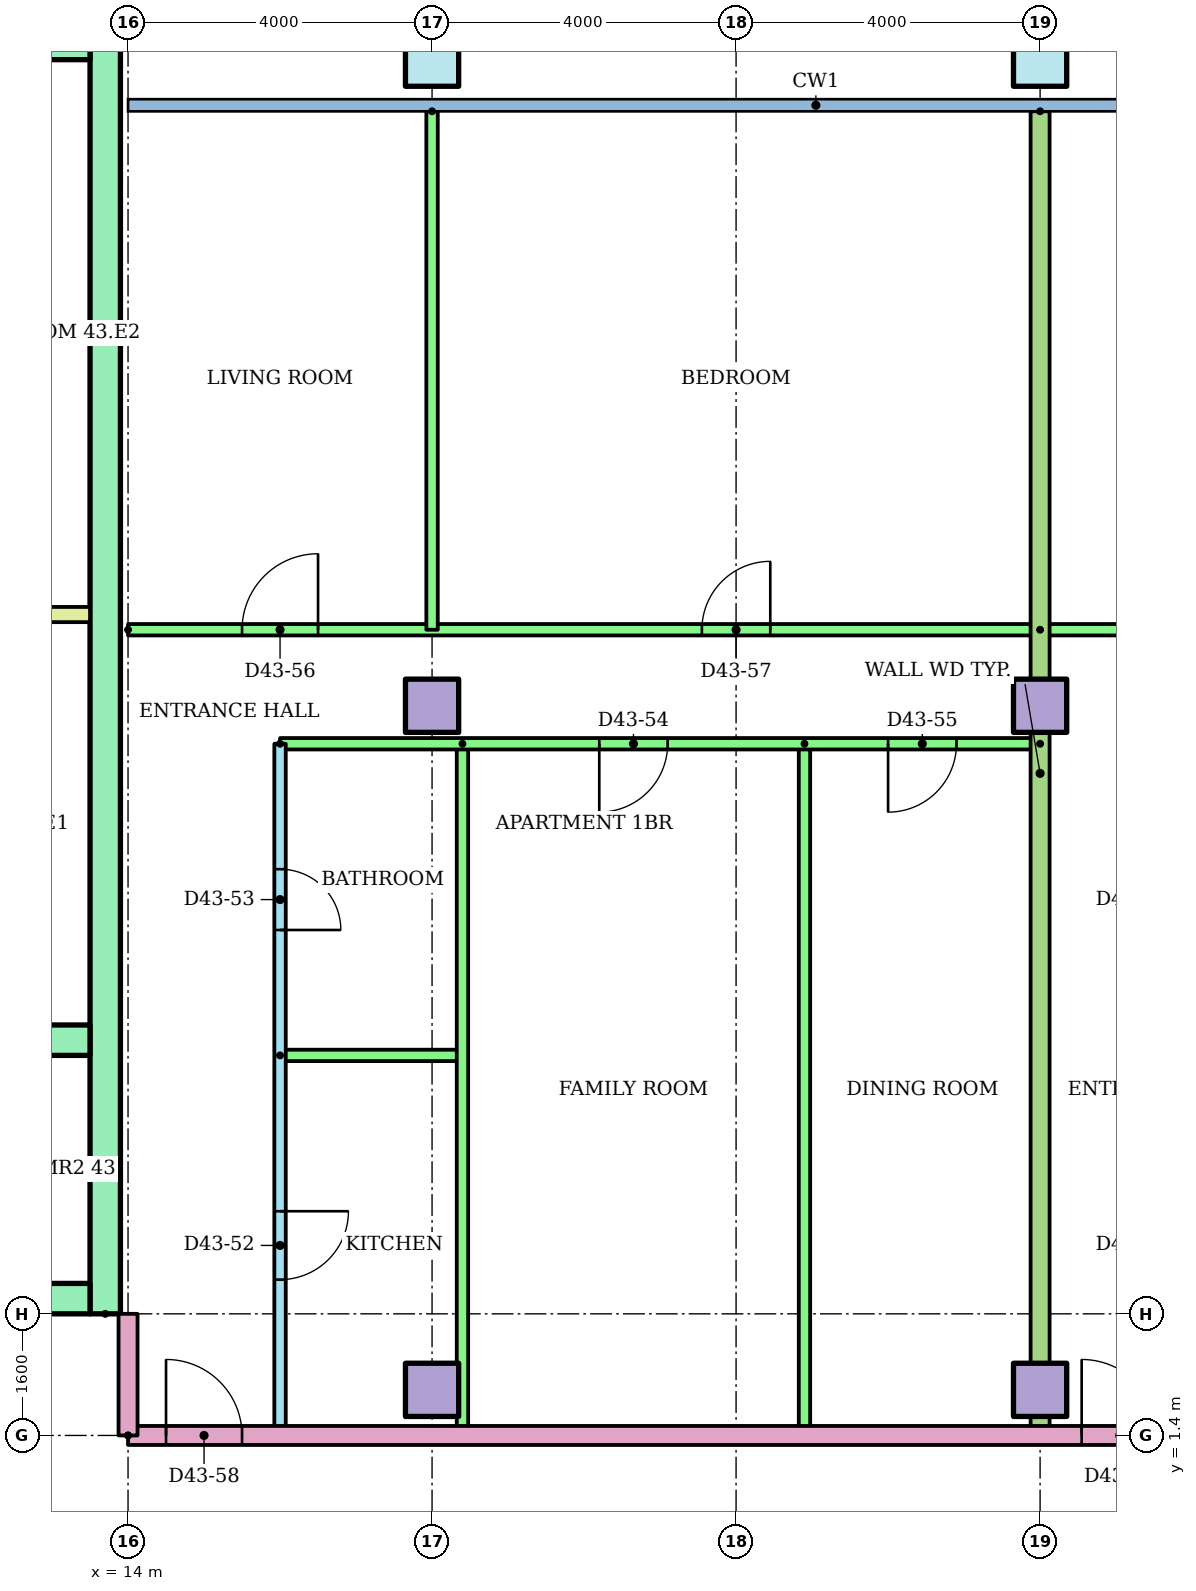
"""IFC4 building model, lengths in metres.
Left out: names, types, materials, properties, quantities, classifications, styles, units other than length and angle.
Written with IfcOpenShell. Run it as: python <this file> out.ifc"""

import sys

from ifc_helpers import new_model, si_unit, direction, frame, frame_2d, origin, origin_2d, place, context, subcontext, project, spatial, rectangle, hollow_rectangle, extrude, element, fill, save


model = new_model("IFC4")
c1 = context("Model", 3, precision=1e-05, world=origin(), true_north=direction((0.0, 1.0)))
c2 = subcontext(c1, "Body", "Model", "MODEL_VIEW")
j1 = project(units=[si_unit("LENGTHUNIT", "METRE"), si_unit("PLANEANGLEUNIT", "RADIAN")], contexts=[c1])
p1 = place(None, origin())
s1 = spatial("IfcSite", under=j1, at=p1, CompositionType="ELEMENT")
p2 = place(p1, origin())
s2 = spatial("IfcBuilding", under=s1, at=p2, CompositionType="ELEMENT")
p3 = place(p2, frame((0.0, 0.0, 168.5)))
s3 = spatial("IfcBuildingStorey", under=s2, at=p3, CompositionType="ELEMENT", Elevation=168.5)
for number, where in (
    (1, (18.0, 2.0, 0.0)),
    (2, (26.0, 2.0, 0.0)),
    (3, (18.0, 11.0, 0.0)),
    (4, (26.0, 11.0, 0.0)),
):
    element("IfcColumn", number, at=place(p3, frame(where)), inside=s3, PredefinedType="COLUMN", context=c2, shape_type="SweptSolid", body=[
        extrude(rectangle(XDim=0.7, YDim=0.7, at=origin_2d()), origin(), (0.0, 0.0, 1.0), 3.2),
    ])
for number, where in (
    (5, (18.0, 19.5, 0.0)),
    (6, (26.0, 19.5, 0.0)),
):
    element("IfcColumn", number, at=place(p3, frame(where)), inside=s3, PredefinedType="COLUMN", context=c2, shape_type="SweptSolid", body=[
        extrude(hollow_rectangle(XDim=0.7, YDim=0.7, WallThickness=0.036, at=origin_2d()), origin(), (0.0, 0.0, 1.0), 3.2),
    ])
p4 = place(p3, frame((13.7, 3.0, 0.0), z_axis=(0.0, 0.0, 1.0), x_axis=(0.0, 1.0, 0.0)))
e7 = element("IfcWall", 7, at=p4, inside=s3, PredefinedType="SHEAR", context=c2, shape_type="SweptSolid", body=[
    extrude(rectangle(XDim=17.0, YDim=0.4, at=frame_2d((8.5, 0.0))), origin(), (0.0, 0.0, 1.0), 2.92),
])
p5 = place(p3, frame((-13.5, 19.7, 0.0)))
e8 = element("IfcWall", 8, at=p5, inside=s3, PredefinedType="SHEAR", context=c2, shape_type="SweptSolid", body=[
    extrude(rectangle(XDim=27.0, YDim=0.4, at=frame_2d((13.5, 0.0))), origin(), (0.0, 0.0, 1.0), 2.92),
])
p6 = place(p3, frame((-13.5, 3.2, 0.0)))
e9 = element("IfcWall", 9, at=p6, inside=s3, PredefinedType="SHEAR", context=c2, shape_type="SweptSolid", body=[
    extrude(rectangle(XDim=27.0, YDim=0.4, at=frame_2d((13.5, 0.0))), origin(), (0.0, 0.0, 1.0), 2.92),
])
p7 = place(p6, frame((22.083, 0.0, 0.0)))
e10 = element("IfcOpeningElement", 10, at=p7, cuts=e9, PredefinedType="OPENING", context=c2, shape_type="SweptSolid", body=[
    extrude(rectangle(XDim=1.1, YDim=2.1, at=frame_2d((0.55, 1.05))), frame((0.0, 0.21, 0.0), z_axis=(0.0, -1.0, 0.0), x_axis=(1.0, 0.0, 0.0)), (0.0, 0.0, 1.0), 0.42),
])
p8 = place(p6, frame((25.128, 0.0, 0.0)))
e11 = element("IfcOpeningElement", 11, at=p8, cuts=e9, PredefinedType="OPENING", context=c2, shape_type="SweptSolid", body=[
    extrude(rectangle(XDim=1.1, YDim=2.1, at=frame_2d((0.55, 1.05))), frame((0.0, 0.21, 0.0), z_axis=(0.0, -1.0, 0.0), x_axis=(1.0, 0.0, 0.0)), (0.0, 0.0, 1.0), 0.42),
])
p9 = place(p6, frame((12.6, 0.0, 0.0)))
e12 = element("IfcOpeningElement", 12, at=p9, cuts=e9, PredefinedType="OPENING", context=c2, shape_type="SweptSolid", body=[
    extrude(rectangle(XDim=1.8, YDim=2.1, at=frame_2d((0.9, 1.05))), frame((0.0, 0.21, 0.0), z_axis=(0.0, -1.0, 0.0), x_axis=(1.0, 0.0, 0.0)), (0.0, 0.0, 1.0), 0.42),
])
p10 = place(p3, frame((1.522, 6.6, 0.0)))
e13 = element("IfcWall", 13, at=p10, inside=s3, PredefinedType="SHEAR", context=c2, shape_type="SweptSolid", body=[
    extrude(rectangle(XDim=11.978, YDim=0.4, at=frame_2d((5.989, 0.0))), origin(), (0.0, 0.0, 1.0), 2.92),
])
p11 = place(p10, frame((2.544, 0.0, 0.0)))
e14 = element("IfcOpeningElement", 14, at=p11, cuts=e13, PredefinedType="OPENING", context=c2, shape_type="SweptSolid", body=[
    extrude(rectangle(XDim=1.0, YDim=2.1, at=frame_2d((0.5, 1.05))), frame((0.0, 0.21, 0.0), z_axis=(0.0, -1.0, 0.0), x_axis=(1.0, 0.0, 0.0)), (0.0, 0.0, 1.0), 0.42),
])
p12 = place(p3, frame((9.6, 12.2, 0.0)))
e15 = element("IfcWall", 15, at=p12, inside=s3, PredefinedType="PARTITIONING", context=c2, shape_type="SweptSolid", body=[
    extrude(rectangle(XDim=3.9, YDim=0.2, at=frame_2d((1.95, 0.0))), origin(), (0.0, 0.0, 1.0), 2.92),
])
p13 = place(p3, frame((16.0, 10.5, 0.0), z_axis=(0.0, 0.0, 1.0), x_axis=(0.0, -1.0, 0.0)))
e16 = element("IfcWall", 16, at=p13, inside=s3, PredefinedType="PARTITIONING", context=c2, shape_type="SweptSolid", body=[
    extrude(rectangle(XDim=9.1, YDim=0.15, at=frame_2d((4.55, 0.0))), origin(), (0.0, 0.0, 1.0), 2.4),
])
p14 = place(p13, frame((6.15, 0.0, 0.0)))
e17 = element("IfcOpeningElement", 17, at=p14, cuts=e16, PredefinedType="OPENING", context=c2, shape_type="SweptSolid", body=[
    extrude(rectangle(XDim=0.9, YDim=2.1, at=frame_2d((0.45, 1.05))), frame((0.0, 0.085, 0.0), z_axis=(0.0, -1.0, 0.0), x_axis=(1.0, 0.0, 0.0)), (0.0, 0.0, 1.0), 0.17),
])
p15 = place(p13, frame((1.65, 0.0, 0.0)))
e18 = element("IfcOpeningElement", 18, at=p15, cuts=e16, PredefinedType="OPENING", context=c2, shape_type="SweptSolid", body=[
    extrude(rectangle(XDim=0.8, YDim=2.1, at=frame_2d((0.4, 1.05))), frame((0.0, 0.085, 0.0), z_axis=(0.0, -1.0, 0.0), x_axis=(1.0, 0.0, 0.0)), (0.0, 0.0, 1.0), 0.17),
])
p16 = place(p3, frame((16.0, 6.4, 0.0)))
e19 = element("IfcWall", 19, at=p16, inside=s3, PredefinedType="PARTITIONING", context=c2, shape_type="SweptSolid", body=[
    extrude(rectangle(XDim=2.4, YDim=0.15, at=frame_2d((1.2, 0.0))), origin(), (0.0, 0.0, 1.0), 2.4),
])
for number, where, z_axis, x_axis in (
    (20, (18.4, 10.5, 0.0), (0.0, 0.0, 1.0), (0.0, -1.0, 0.0)),
    (21, (22.9, 10.5, 0.0), (0.0, 0.0, 1.0), (0.0, -1.0, 0.0)),
):
    element("IfcWall", number, at=place(p3, frame(where, z_axis=z_axis, x_axis=x_axis)), inside=s3, PredefinedType="PARTITIONING", context=c2, shape_type="SweptSolid", body=[
        extrude(rectangle(XDim=9.1, YDim=0.15, at=frame_2d((4.55, 0.0))), origin(), (0.0, 0.0, 1.0), 2.4),
    ])
p17 = place(p3, frame((26.0, 10.5, 0.0), z_axis=(0.0, 0.0, 1.0), x_axis=(-1.0, 0.0, 0.0)))
e22 = element("IfcWall", 22, at=p17, inside=s3, PredefinedType="PARTITIONING", context=c2, shape_type="SweptSolid", body=[
    extrude(rectangle(XDim=10.0, YDim=0.15, at=frame_2d((5.0, 0.0))), origin(), (0.0, 0.0, 1.0), 2.4),
])
p18 = place(p17, frame((4.9, 0.0, 0.0)))
e23 = element("IfcOpeningElement", 23, at=p18, cuts=e22, PredefinedType="OPENING", context=c2, shape_type="SweptSolid", body=[
    extrude(rectangle(XDim=0.9, YDim=2.1, at=frame_2d((0.45, 1.05))), frame((0.0, 0.085, 0.0), z_axis=(0.0, -1.0, 0.0), x_axis=(1.0, 0.0, 0.0)), (0.0, 0.0, 1.0), 0.17),
])
p19 = place(p17, frame((1.1, 0.0, 0.0)))
e24 = element("IfcOpeningElement", 24, at=p19, cuts=e22, PredefinedType="OPENING", context=c2, shape_type="SweptSolid", body=[
    extrude(rectangle(XDim=0.9, YDim=2.1, at=frame_2d((0.45, 1.05))), frame((0.0, 0.085, 0.0), z_axis=(0.0, -1.0, 0.0), x_axis=(1.0, 0.0, 0.0)), (0.0, 0.0, 1.0), 0.17),
])
p20 = place(p3, frame((14.0, 12.0, 0.0)))
e25 = element("IfcWall", 25, at=p20, inside=s3, PredefinedType="PARTITIONING", context=c2, shape_type="SweptSolid", body=[
    extrude(rectangle(XDim=12.0, YDim=0.15, at=frame_2d((6.0, 0.0))), origin(), (0.0, 0.0, 1.0), 2.4),
])
p21 = place(p20, frame((1.5, 0.0, 0.0)))
e26 = element("IfcOpeningElement", 26, at=p21, cuts=e25, PredefinedType="OPENING", context=c2, shape_type="SweptSolid", body=[
    extrude(rectangle(XDim=1.0, YDim=2.1, at=frame_2d((0.5, 1.05))), frame((0.0, 0.085, 0.0), z_axis=(0.0, -1.0, 0.0), x_axis=(1.0, 0.0, 0.0)), (0.0, 0.0, 1.0), 0.17),
])
p22 = place(p20, frame((7.55, 0.0, 0.0)))
e27 = element("IfcOpeningElement", 27, at=p22, cuts=e25, PredefinedType="OPENING", context=c2, shape_type="SweptSolid", body=[
    extrude(rectangle(XDim=0.9, YDim=2.1, at=frame_2d((0.45, 1.05))), frame((0.0, 0.085, 0.0), z_axis=(0.0, -1.0, 0.0), x_axis=(1.0, 0.0, 0.0)), (0.0, 0.0, 1.0), 0.17),
])
p23 = place(p3, frame((18.0, 18.821, 0.0), z_axis=(0.0, 0.0, 1.0), x_axis=(0.0, -1.0, 0.0)))
e28 = element("IfcWall", 28, at=p23, inside=s3, PredefinedType="PARTITIONING", context=c2, shape_type="SweptSolid", body=[
    extrude(rectangle(XDim=6.821, YDim=0.15, at=frame_2d((3.411, 0.0))), origin(), (0.0, 0.0, 1.0), 2.4),
])
p24 = place(p3, frame((26.0, 12.0, 0.0)))
e29 = element("IfcWall", 29, at=p24, inside=s3, PredefinedType="PARTITIONING", context=c2, shape_type="SweptSolid", body=[
    extrude(rectangle(XDim=10.82, YDim=0.15, at=frame_2d((5.41, 0.0))), origin(), (0.0, 0.0, 1.0), 2.4),
])
p25 = place(p24, frame((2.55, 0.0, 0.0)))
e30 = element("IfcOpeningElement", 30, at=p25, cuts=e29, PredefinedType="OPENING", context=c2, shape_type="SweptSolid", body=[
    extrude(rectangle(XDim=1.0, YDim=2.1, at=frame_2d((0.5, 1.05))), frame((0.0, 0.085, 0.0), z_axis=(0.0, -1.0, 0.0), x_axis=(1.0, 0.0, 0.0)), (0.0, 0.0, 1.0), 0.17),
])
p26 = place(p24, frame((8.547, 0.0, 0.0)))
e31 = element("IfcOpeningElement", 31, at=p26, cuts=e29, PredefinedType="OPENING", context=c2, shape_type="SweptSolid", body=[
    extrude(rectangle(XDim=1.0, YDim=2.1, at=frame_2d((0.5, 1.05))), frame((0.0, 0.085, 0.0), z_axis=(0.0, -1.0, 0.0), x_axis=(1.0, 0.0, 0.0)), (0.0, 0.0, 1.0), 0.17),
])
p27 = place(p3, frame((26.0, 18.821, 0.0), z_axis=(0.0, 0.0, 1.0), x_axis=(0.0, -1.0, 0.0)))
e32 = element("IfcWall", 32, at=p27, inside=s3, PredefinedType="PARTITIONING", context=c2, shape_type="SweptSolid", body=[
    extrude(rectangle(XDim=17.421, YDim=0.25, at=frame_2d((8.71, 0.0))), origin(), (0.0, 0.0, 1.0), 2.4),
])
p28 = place(p3, frame((14.0, 1.4, 0.0)))
e33 = element("IfcWall", 33, at=p28, inside=s3, PredefinedType="PARTITIONING", context=c2, shape_type="SweptSolid", body=[
    extrude(rectangle(XDim=15.0, YDim=0.25, at=frame_2d((7.5, 0.0))), origin(), (0.0, 0.0, 1.0), 2.4),
])
p29 = place(p28, frame((0.5, 0.0, 0.0)))
e34 = element("IfcOpeningElement", 34, at=p29, cuts=e33, PredefinedType="OPENING", context=c2, shape_type="SweptSolid", body=[
    extrude(rectangle(XDim=1.0, YDim=2.1, at=frame_2d((0.5, 1.05))), frame((0.0, 0.135, 0.0), z_axis=(0.0, -1.0, 0.0), x_axis=(1.0, 0.0, 0.0)), (0.0, 0.0, 1.0), 0.27),
])
p30 = place(p28, frame((12.547, 0.0, 0.0)))
e35 = element("IfcOpeningElement", 35, at=p30, cuts=e33, PredefinedType="OPENING", context=c2, shape_type="SweptSolid", body=[
    extrude(rectangle(XDim=1.0, YDim=2.1, at=frame_2d((0.5, 1.05))), frame((0.0, 0.135, 0.0), z_axis=(0.0, -1.0, 0.0), x_axis=(1.0, 0.0, 0.0)), (0.0, 0.0, 1.0), 0.27),
])
p31 = place(p3, frame((14.0, 1.4, 0.0), z_axis=(0.0, 0.0, 1.0), x_axis=(0.0, 1.0, 0.0)))
e36 = element("IfcWall", 36, at=p31, inside=s3, PredefinedType="PARTITIONING", context=c2, shape_type="SweptSolid", body=[
    extrude(rectangle(XDim=1.6, YDim=0.25, at=frame_2d((0.8, 0.0))), origin(), (0.0, 0.0, 1.0), 2.4),
])
p32 = place(p14, origin())
e37 = element("IfcDoor", 37, at=p32, inside=s3, OperationType="SINGLE_SWING_LEFT", PredefinedType="DOOR", context=c2, shape_type="SweptSolid", body=[
    extrude(rectangle(XDim=0.9, YDim=2.1, at=frame_2d((0.45, 1.05))), frame((0.0, 0.025, 0.0), z_axis=(0.0, -1.0, 0.0), x_axis=(1.0, 0.0, 0.0)), (0.0, 0.0, 1.0), 0.05),
])
fill(e17, e37)
p33 = place(p15, origin())
e38 = element("IfcDoor", 38, at=p33, inside=s3, OperationType="SINGLE_SWING_RIGHT", PredefinedType="DOOR", context=c2, shape_type="SweptSolid", body=[
    extrude(rectangle(XDim=0.8, YDim=2.1, at=frame_2d((0.4, 1.05))), frame((0.0, 0.025, 0.0), z_axis=(0.0, -1.0, 0.0), x_axis=(1.0, 0.0, 0.0)), (0.0, 0.0, 1.0), 0.05),
])
fill(e18, e38)
p34 = place(p18, origin())
e39 = element("IfcDoor", 39, at=p34, inside=s3, OperationType="SINGLE_SWING_RIGHT", PredefinedType="DOOR", context=c2, shape_type="SweptSolid", body=[
    extrude(rectangle(XDim=0.9, YDim=2.1, at=frame_2d((0.45, 1.05))), frame((0.0, 0.025, 0.0), z_axis=(0.0, -1.0, 0.0), x_axis=(1.0, 0.0, 0.0)), (0.0, 0.0, 1.0), 0.05),
])
fill(e23, e39)
p35 = place(p19, origin())
e40 = element("IfcDoor", 40, at=p35, inside=s3, OperationType="SINGLE_SWING_RIGHT", PredefinedType="DOOR", context=c2, shape_type="SweptSolid", body=[
    extrude(rectangle(XDim=0.9, YDim=2.1, at=frame_2d((0.45, 1.05))), frame((0.0, 0.025, 0.0), z_axis=(0.0, -1.0, 0.0), x_axis=(1.0, 0.0, 0.0)), (0.0, 0.0, 1.0), 0.05),
])
fill(e24, e40)
p36 = place(p21, origin())
e41 = element("IfcDoor", 41, at=p36, inside=s3, OperationType="SINGLE_SWING_RIGHT", PredefinedType="DOOR", context=c2, shape_type="SweptSolid", body=[
    extrude(rectangle(XDim=1.0, YDim=2.1, at=frame_2d((0.5, 1.05))), frame((0.0, 0.025, 0.0), z_axis=(0.0, -1.0, 0.0), x_axis=(1.0, 0.0, 0.0)), (0.0, 0.0, 1.0), 0.05),
])
fill(e26, e41)
p37 = place(p22, origin())
e42 = element("IfcDoor", 42, at=p37, inside=s3, OperationType="SINGLE_SWING_RIGHT", PredefinedType="DOOR", context=c2, shape_type="SweptSolid", body=[
    extrude(rectangle(XDim=0.9, YDim=2.1, at=frame_2d((0.45, 1.05))), frame((0.0, 0.025, 0.0), z_axis=(0.0, -1.0, 0.0), x_axis=(1.0, 0.0, 0.0)), (0.0, 0.0, 1.0), 0.05),
])
fill(e27, e42)
p38 = place(p29, origin())
e43 = element("IfcDoor", 43, at=p38, inside=s3, OperationType="SINGLE_SWING_LEFT", PredefinedType="DOOR", context=c2, shape_type="SweptSolid", body=[
    extrude(rectangle(XDim=1.0, YDim=2.1, at=frame_2d((0.5, 1.05))), frame((0.0, 0.025, 0.0), z_axis=(0.0, -1.0, 0.0), x_axis=(1.0, 0.0, 0.0)), (0.0, 0.0, 1.0), 0.05),
])
fill(e34, e43)
p39 = place(p30, origin())
e44 = element("IfcDoor", 44, at=p39, inside=s3, OperationType="SINGLE_SWING_LEFT", PredefinedType="DOOR", context=c2, shape_type="SweptSolid", body=[
    extrude(rectangle(XDim=1.0, YDim=2.1, at=frame_2d((0.5, 1.05))), frame((0.0, 0.025, 0.0), z_axis=(0.0, -1.0, 0.0), x_axis=(1.0, 0.0, 0.0)), (0.0, 0.0, 1.0), 0.05),
])
fill(e35, e44)
save(model, sys.argv[1])
